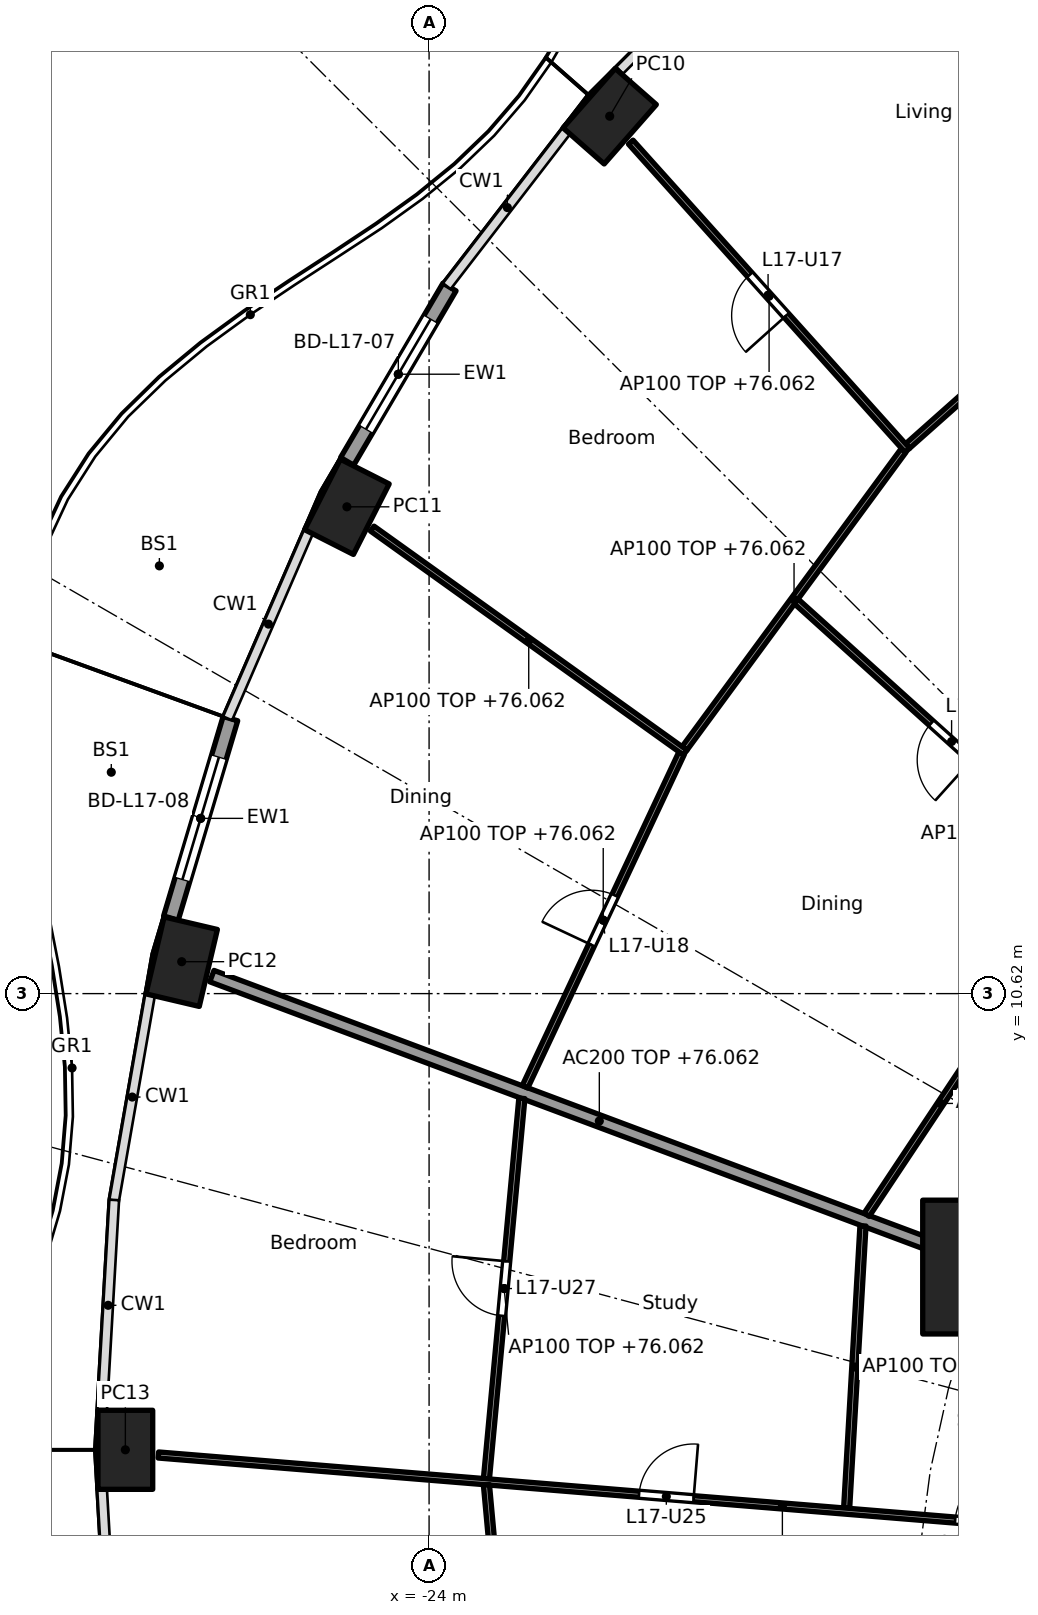
"""IFC4 building model, lengths in metres.
Left out: names, types, materials, properties, quantities, classifications, styles, units other than length and angle.
Written with IfcOpenShell. Run it as: python <this file> out.ifc"""

import sys

from ifc_helpers import new_model, si_unit, direction, frame, frame_2d, origin, origin_2d, place, context, subcontext, project, spatial, rectangle, hollow_rectangle, extrude, element, fill, save


model = new_model("IFC4")
c1 = context("Model", 3, precision=1e-05, world=origin(), true_north=direction((0.0, 1.0)))
c2 = subcontext(c1, "Body", "Model", "MODEL_VIEW")
j1 = project(units=[si_unit("LENGTHUNIT", "METRE"), si_unit("PLANEANGLEUNIT", "RADIAN")], contexts=[c1])
p1 = place(None, origin())
s1 = spatial("IfcSite", under=j1, at=p1, CompositionType="ELEMENT")
p2 = place(p1, origin())
s2 = spatial("IfcBuilding", under=s1, at=p2, CompositionType="ELEMENT")
p3 = place(p2, frame((0.0, 0.0, 73.3)))
s3 = spatial("IfcBuildingStorey", under=s2, at=p3, CompositionType="ELEMENT", Elevation=73.3)
for number, where, z_axis, x_axis in (
    (1, (-21.03, 25.049, -0.26), (0.0, 0.0, 1.0), (-0.66, -0.751, 0.0)),
    (2, (-25.352, 18.625, -0.26), (0.0, 0.0, 1.0), (-0.452, -0.892, 0.0)),
    (3, (-28.068, 11.145, -0.26), (0.0, 0.0, 1.0), (-0.229, -0.973, 0.0)),
    (4, (-28.995, 3.118, -0.26), (0.0, 0.0, 1.0), (0.0, -1.0, 0.0)),
):
    element("IfcColumn", number, at=place(p3, frame(where, z_axis=z_axis, x_axis=x_axis)), inside=s3, PredefinedType="COLUMN", context=c2, shape_type="SweptSolid", body=[
        extrude(hollow_rectangle(XDim=1.3, YDim=0.9, WallThickness=0.045, at=origin_2d()), origin(), (0.0, 0.0, 1.0), 3.96),
    ])
p4 = place(p3, frame((-14.782, 6.123, 0.0), z_axis=(0.0, 0.0, 1.0), x_axis=(1.0, 0.0, 0.0)))
e5 = element("IfcColumn", 5, at=p4, inside=s3, PredefinedType="COLUMN", context=c2, shape_type="SweptSolid", body=[
    extrude(rectangle(XDim=2.2, YDim=2.2, at=origin_2d()), origin(), (0.0, 0.0, 1.0), 3.7),
])
p5 = place(p3, frame((-25.348, 19.372, 0.0), z_axis=(0.0, 0.0, 1.0), x_axis=(0.506352525095, 0.86232657406, 0.0)))
e6 = element("IfcWall", 6, at=p5, inside=s3, PredefinedType="SOLIDWALL", context=c2, shape_type="SweptSolid", body=[
    extrude(rectangle(XDim=3.325, YDim=0.25, at=frame_2d((1.663, 0.0))), origin(), (0.0, 0.0, 1.0), 3.44),
])
p6 = place(p5, frame((0.612, 0.0, 0.0)))
e7 = element("IfcOpeningElement", 7, at=p6, cuts=e6, PredefinedType="OPENING", context=c2, shape_type="SweptSolid", body=[
    extrude(rectangle(XDim=2.1, YDim=2.4, at=frame_2d((1.05, 1.2))), frame((0.0, 0.135, 0.0), z_axis=(0.0, -1.0, 0.0), x_axis=(1.0, 0.0, 0.0)), (0.0, 0.0, 1.0), 0.27),
])
p7 = place(p3, frame((-28.246, 11.862, 0.0), z_axis=(0.0, 0.0, 1.0), x_axis=(0.285816610469, 0.958284334203, 0.0)))
e8 = element("IfcWall", 8, at=p7, inside=s3, PredefinedType="SOLIDWALL", context=c2, shape_type="SweptSolid", body=[
    extrude(rectangle(XDim=3.424, YDim=0.25, at=frame_2d((1.712, 0.0))), origin(), (0.0, 0.0, 1.0), 3.44),
])
p8 = place(p7, frame((0.662, 0.0, 0.0)))
e9 = element("IfcOpeningElement", 9, at=p8, cuts=e8, PredefinedType="OPENING", context=c2, shape_type="SweptSolid", body=[
    extrude(rectangle(XDim=2.1, YDim=2.4, at=frame_2d((1.05, 1.2))), frame((0.0, 0.135, 0.0), z_axis=(0.0, -1.0, 0.0), x_axis=(1.0, 0.0, 0.0)), (0.0, 0.0, 1.0), 0.27),
])
p9 = place(p3, frame((-14.829, 6.14, 0.0), z_axis=(0.0, 0.0, 1.0), x_axis=(-0.936597324342, 0.35040755134, 0.0)))
e10 = element("IfcWall", 10, at=p9, inside=s3, PredefinedType="PARTITIONING", context=c2, shape_type="SweptSolid", body=[
    extrude(rectangle(XDim=13.606, YDim=0.2, at=frame_2d((6.803, 0.0))), origin(), (0.0, 0.0, 1.0), 2.762),
])
p10 = place(p3, frame((-11.516, 23.726, 0.0), z_axis=(0.0, 0.0, 1.0), x_axis=(-0.747428955243, -0.664341747043, 0.0)))
e11 = element("IfcWall", 11, at=p10, inside=s3, PredefinedType="PARTITIONING", context=c2, shape_type="SweptSolid", body=[
    extrude(rectangle(XDim=6.174, YDim=0.1, at=frame_2d((3.087, 0.0))), origin(), (0.0, 0.0, 1.0), 2.762),
])
p11 = place(p10, frame((2.662, 0.0, 0.0)))
e12 = element("IfcOpeningElement", 12, at=p11, cuts=e11, PredefinedType="OPENING", context=c2, shape_type="SweptSolid", body=[
    extrude(rectangle(XDim=0.9, YDim=2.1, at=frame_2d((0.45, 1.05))), frame((0.0, 0.06, 0.0), z_axis=(0.0, -1.0, 0.0), x_axis=(1.0, 0.0, 0.0)), (0.0, 0.0, 1.0), 0.12),
])
p12 = place(p3, frame((-16.134, 19.554, 0.0), z_axis=(0.0, 0.0, 1.0), x_axis=(-0.667985610263, 0.74417418961, 0.0)))
e13 = element("IfcWall", 13, at=p12, inside=s3, PredefinedType="PARTITIONING", context=c2, shape_type="SweptSolid", body=[
    extrude(rectangle(XDim=6.809, YDim=0.1, at=frame_2d((3.405, 0.0))), origin(), (0.0, 0.0, 1.0), 2.762),
])
p13 = place(p12, frame((2.98, 0.0, 0.0)))
e14 = element("IfcOpeningElement", 14, at=p13, cuts=e13, PredefinedType="OPENING", context=c2, shape_type="SweptSolid", body=[
    extrude(rectangle(XDim=0.9, YDim=2.1, at=frame_2d((0.45, 1.05))), frame((0.0, 0.06, 0.0), z_axis=(0.0, -1.0, 0.0), x_axis=(1.0, 0.0, 0.0)), (0.0, 0.0, 1.0), 0.12),
])
p14 = place(p3, frame((-16.197, 19.551, 0.0), z_axis=(0.0, 0.0, 1.0), x_axis=(-0.592391983588, -0.80564988536, 0.0)))
e15 = element("IfcWall", 15, at=p14, inside=s3, PredefinedType="PARTITIONING", context=c2, shape_type="SweptSolid", body=[
    extrude(rectangle(XDim=6.08, YDim=0.1, at=frame_2d((3.04, 0.0))), origin(), (0.0, 0.0, 1.0), 2.762),
])
p15 = place(p3, frame((-8.959, 8.952, 0.0), z_axis=(0.0, 0.0, 1.0), x_axis=(-0.742679904999, 0.669646592398, 0.0)))
e16 = element("IfcWall", 16, at=p15, inside=s3, PredefinedType="PARTITIONING", context=c2, shape_type="SweptSolid", body=[
    extrude(rectangle(XDim=12.121, YDim=0.1, at=frame_2d((6.061, 0.0))), origin(), (0.0, 0.0, 1.0), 2.687),
])
p16 = place(p15, frame((2.172, 0.0, 0.0)))
e17 = element("IfcOpeningElement", 17, at=p16, cuts=e16, PredefinedType="OPENING", context=c2, shape_type="SweptSolid", body=[
    extrude(rectangle(XDim=0.9, YDim=2.1, at=frame_2d((0.45, 1.05))), frame((0.0, 0.06, 0.0), z_axis=(0.0, -1.0, 0.0), x_axis=(1.0, 0.0, 0.0)), (0.0, 0.0, 1.0), 0.12),
])
p17 = place(p15, frame((8.233, 0.0, 0.0)))
e18 = element("IfcOpeningElement", 18, at=p17, cuts=e16, PredefinedType="OPENING", context=c2, shape_type="SweptSolid", body=[
    extrude(rectangle(XDim=0.9, YDim=2.1, at=frame_2d((0.45, 1.05))), frame((0.0, 0.06, 0.0), z_axis=(0.0, -1.0, 0.0), x_axis=(1.0, 0.0, 0.0)), (0.0, 0.0, 1.0), 0.12),
])
p18 = place(p3, frame((-14.371, 10.645, 0.0), z_axis=(0.0, 0.0, 1.0), x_axis=(-0.553341009285, -0.832954817168, 0.0)))
e19 = element("IfcWall", 19, at=p18, inside=s3, PredefinedType="PARTITIONING", context=c2, shape_type="SweptSolid", body=[
    extrude(rectangle(XDim=4.396, YDim=0.1, at=frame_2d((2.198, 0.0))), origin(), (0.0, 0.0, 1.0), 2.762),
])
p19 = place(p3, frame((-19.788, 14.583, 0.0), z_axis=(0.0, 0.0, 1.0), x_axis=(-0.813175286569, 0.58201885993, 0.0)))
e20 = element("IfcWall", 20, at=p19, inside=s3, PredefinedType="PARTITIONING", context=c2, shape_type="SweptSolid", body=[
    extrude(rectangle(XDim=6.329, YDim=0.1, at=frame_2d((3.164, 0.0))), origin(), (0.0, 0.0, 1.0), 2.762),
])
p20 = place(p3, frame((-19.85, 14.567, 0.0), z_axis=(0.0, 0.0, 1.0), x_axis=(-0.424942210745, -0.905220480064, 0.0)))
e21 = element("IfcWall", 21, at=p20, inside=s3, PredefinedType="PARTITIONING", context=c2, shape_type="SweptSolid", body=[
    extrude(rectangle(XDim=6.053, YDim=0.1, at=frame_2d((3.027, 0.0))), origin(), (0.0, 0.0, 1.0), 2.762),
])
p21 = place(p20, frame((2.577, 0.0, 0.0)))
e22 = element("IfcOpeningElement", 22, at=p21, cuts=e21, PredefinedType="OPENING", context=c2, shape_type="SweptSolid", body=[
    extrude(rectangle(XDim=0.9, YDim=2.1, at=frame_2d((0.45, 1.05))), frame((0.0, 0.06, 0.0), z_axis=(0.0, -1.0, 0.0), x_axis=(1.0, 0.0, 0.0)), (0.0, 0.0, 1.0), 0.12),
])
p22 = place(p3, frame((-16.865, 6.8, 0.0), z_axis=(0.0, 0.0, 1.0), x_axis=(-0.057758567218, -0.998330580476, 0.0)))
e23 = element("IfcWall", 23, at=p22, inside=s3, PredefinedType="PARTITIONING", context=c2, shape_type="SweptSolid", body=[
    extrude(rectangle(XDim=4.65, YDim=0.1, at=frame_2d((2.325, 0.0))), origin(), (0.0, 0.0, 1.0), 2.762),
])
p23 = place(p3, frame((-22.474, 8.898, 0.0), z_axis=(0.0, 0.0, 1.0), x_axis=(-0.092756864489, -0.995688788774, 0.0)))
e24 = element("IfcWall", 24, at=p23, inside=s3, PredefinedType="PARTITIONING", context=c2, shape_type="SweptSolid", body=[
    extrude(rectangle(XDim=6.283, YDim=0.1, at=frame_2d((3.141, 0.0))), origin(), (0.0, 0.0, 1.0), 2.762),
])
p24 = place(p23, frame((2.691, 0.0, 0.0)))
e25 = element("IfcOpeningElement", 25, at=p24, cuts=e24, PredefinedType="OPENING", context=c2, shape_type="SweptSolid", body=[
    extrude(rectangle(XDim=0.9, YDim=2.1, at=frame_2d((0.45, 1.05))), frame((0.0, 0.06, 0.0), z_axis=(0.0, -1.0, 0.0), x_axis=(1.0, 0.0, 0.0)), (0.0, 0.0, 1.0), 0.12),
])
p25 = place(p3, frame((-12.665, 1.743, 0.0), z_axis=(0.0, 0.0, 1.0), x_axis=(-0.996680482238, 0.081412630013, 0.0)))
e26 = element("IfcWall", 26, at=p25, inside=s3, PredefinedType="PARTITIONING", context=c2, shape_type="SweptSolid", body=[
    extrude(rectangle(XDim=15.84, YDim=0.1, at=frame_2d((7.92, 0.0))), origin(), (0.0, 0.0, 1.0), 2.687),
])
p26 = place(p25, frame((1.793, 0.0, 0.0)))
e27 = element("IfcOpeningElement", 27, at=p26, cuts=e26, PredefinedType="OPENING", context=c2, shape_type="SweptSolid", body=[
    extrude(rectangle(XDim=0.9, YDim=2.1, at=frame_2d((0.45, 1.05))), frame((0.0, 0.06, 0.0), z_axis=(0.0, -1.0, 0.0), x_axis=(1.0, 0.0, 0.0)), (0.0, 0.0, 1.0), 0.12),
])
p27 = place(p25, frame((7.009, 0.0, 0.0)))
e28 = element("IfcOpeningElement", 28, at=p27, cuts=e26, PredefinedType="OPENING", context=c2, shape_type="SweptSolid", body=[
    extrude(rectangle(XDim=0.9, YDim=2.1, at=frame_2d((0.45, 1.05))), frame((0.0, 0.06, 0.0), z_axis=(0.0, -1.0, 0.0), x_axis=(1.0, 0.0, 0.0)), (0.0, 0.0, 1.0), 0.12),
])
p28 = place(p3, frame((-23.057, 2.542, 0.0), z_axis=(0.0, 0.0, 1.0), x_axis=(0.091380945427, -0.995816008514, 0.0)))
e29 = element("IfcWall", 29, at=p28, inside=s3, PredefinedType="PARTITIONING", context=c2, shape_type="SweptSolid", body=[
    extrude(rectangle(XDim=6.302, YDim=0.1, at=frame_2d((3.151, 0.0))), origin(), (0.0, 0.0, 1.0), 2.762),
])
p29 = place(p28, frame((2.701, 0.0, 0.0)))
e30 = element("IfcOpeningElement", 30, at=p29, cuts=e29, PredefinedType="OPENING", context=c2, shape_type="SweptSolid", body=[
    extrude(rectangle(XDim=0.9, YDim=2.1, at=frame_2d((0.45, 1.05))), frame((0.0, 0.06, 0.0), z_axis=(0.0, -1.0, 0.0), x_axis=(1.0, 0.0, 0.0)), (0.0, 0.0, 1.0), 0.12),
])
p30 = place(p6, origin())
e31 = element("IfcDoor", 31, at=p30, inside=s3, OperationType="SLIDING_TO_LEFT", PredefinedType="DOOR", context=c2, shape_type="SweptSolid", body=[
    extrude(rectangle(XDim=2.1, YDim=2.4, at=frame_2d((1.05, 1.2))), frame((0.0, 0.025, 0.0), z_axis=(0.0, -1.0, 0.0), x_axis=(1.0, 0.0, 0.0)), (0.0, 0.0, 1.0), 0.05),
])
fill(e7, e31)
p31 = place(p8, origin())
e32 = element("IfcDoor", 32, at=p31, inside=s3, OperationType="SLIDING_TO_LEFT", PredefinedType="DOOR", context=c2, shape_type="SweptSolid", body=[
    extrude(rectangle(XDim=2.1, YDim=2.4, at=frame_2d((1.05, 1.2))), frame((0.0, 0.025, 0.0), z_axis=(0.0, -1.0, 0.0), x_axis=(1.0, 0.0, 0.0)), (0.0, 0.0, 1.0), 0.05),
])
fill(e9, e32)
p32 = place(p17, origin())
e33 = element("IfcDoor", 33, at=p32, inside=s3, OperationType="SINGLE_SWING_LEFT", PredefinedType="DOOR", context=c2, shape_type="SweptSolid", body=[
    extrude(rectangle(XDim=0.9, YDim=2.1, at=frame_2d((0.45, 1.05))), frame((0.0, 0.025, 0.0), z_axis=(0.0, -1.0, 0.0), x_axis=(1.0, 0.0, 0.0)), (0.0, 0.0, 1.0), 0.05),
])
fill(e18, e33)
p33 = place(p13, origin())
e34 = element("IfcDoor", 34, at=p33, inside=s3, OperationType="SINGLE_SWING_LEFT", PredefinedType="DOOR", context=c2, shape_type="SweptSolid", body=[
    extrude(rectangle(XDim=0.9, YDim=2.1, at=frame_2d((0.45, 1.05))), frame((0.0, 0.025, 0.0), z_axis=(0.0, -1.0, 0.0), x_axis=(1.0, 0.0, 0.0)), (0.0, 0.0, 1.0), 0.05),
])
fill(e14, e34)
p34 = place(p21, frame((0.9, 0.0, 0.0), x_axis=(-1.0, 0.0, 0.0)))
e35 = element("IfcDoor", 35, at=p34, inside=s3, OperationType="SINGLE_SWING_LEFT", PredefinedType="DOOR", context=c2, shape_type="SweptSolid", body=[
    extrude(rectangle(XDim=0.9, YDim=2.1, at=frame_2d((0.45, 1.05))), frame((0.0, 0.025, 0.0), z_axis=(0.0, -1.0, 0.0), x_axis=(1.0, 0.0, 0.0)), (0.0, 0.0, 1.0), 0.05),
])
fill(e22, e35)
p35 = place(p26, frame((0.9, 0.0, 0.0), x_axis=(-1.0, 0.0, 0.0)))
e36 = element("IfcDoor", 36, at=p35, inside=s3, OperationType="SINGLE_SWING_RIGHT", PredefinedType="DOOR", context=c2, shape_type="SweptSolid", body=[
    extrude(rectangle(XDim=0.9, YDim=2.1, at=frame_2d((0.45, 1.05))), frame((0.0, 0.025, 0.0), z_axis=(0.0, -1.0, 0.0), x_axis=(1.0, 0.0, 0.0)), (0.0, 0.0, 1.0), 0.05),
])
fill(e27, e36)
p36 = place(p27, frame((0.9, 0.0, 0.0), x_axis=(-1.0, 0.0, 0.0)))
e37 = element("IfcDoor", 37, at=p36, inside=s3, OperationType="SINGLE_SWING_RIGHT", PredefinedType="DOOR", context=c2, shape_type="SweptSolid", body=[
    extrude(rectangle(XDim=0.9, YDim=2.1, at=frame_2d((0.45, 1.05))), frame((0.0, 0.025, 0.0), z_axis=(0.0, -1.0, 0.0), x_axis=(1.0, 0.0, 0.0)), (0.0, 0.0, 1.0), 0.05),
])
fill(e28, e37)
p37 = place(p24, frame((0.9, 0.0, 0.0), x_axis=(-1.0, 0.0, 0.0)))
e38 = element("IfcDoor", 38, at=p37, inside=s3, OperationType="SINGLE_SWING_RIGHT", PredefinedType="DOOR", context=c2, shape_type="SweptSolid", body=[
    extrude(rectangle(XDim=0.9, YDim=2.1, at=frame_2d((0.45, 1.05))), frame((0.0, 0.025, 0.0), z_axis=(0.0, -1.0, 0.0), x_axis=(1.0, 0.0, 0.0)), (0.0, 0.0, 1.0), 0.05),
])
fill(e25, e38)
save(model, sys.argv[1])
